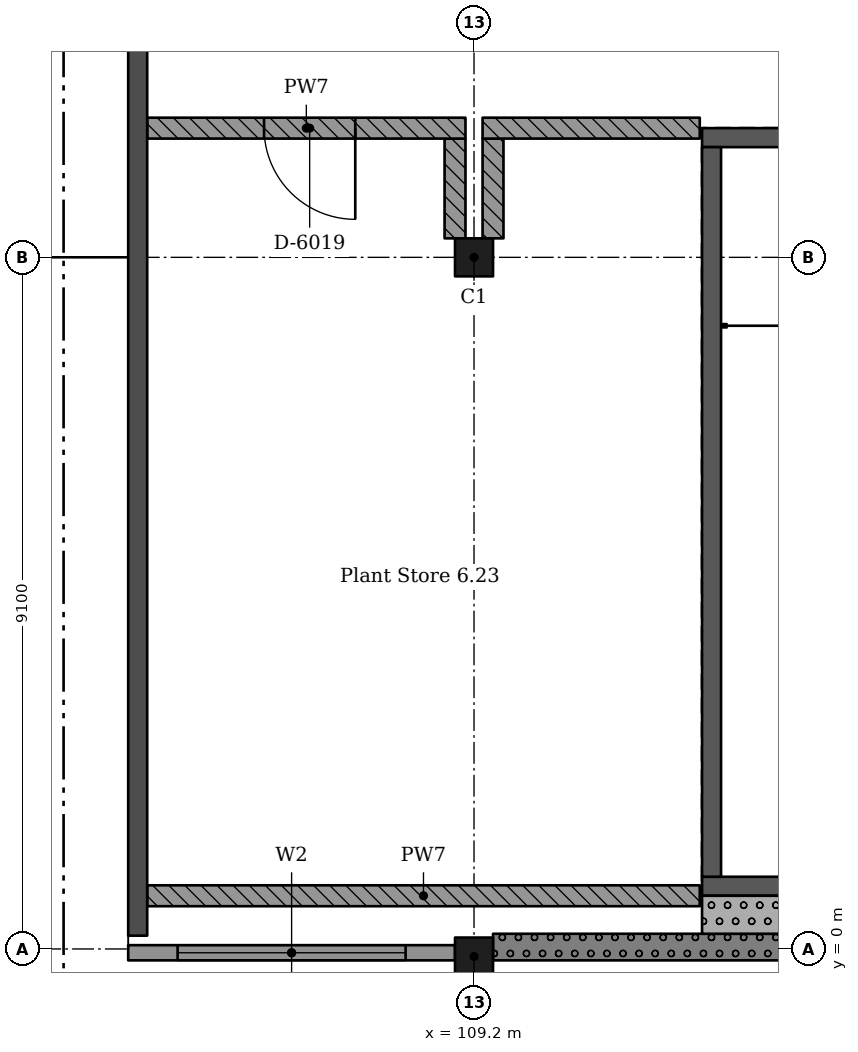
"""IFC4 building model, lengths in metres.
Left out: names, types, materials, properties, quantities, classifications, styles, units other than length and angle.
Written with IfcOpenShell. Run it as: python <this file> out.ifc"""

import sys

from ifc_helpers import new_model, si_unit, direction, frame, frame_2d, origin, origin_2d, place, context, subcontext, project, spatial, rectangle, extrude, element, fill, save


model = new_model("IFC4")
c1 = context("Model", 3, precision=1e-05, world=origin(), true_north=direction((0.0, 1.0)))
c2 = subcontext(c1, "Body", "Model", "MODEL_VIEW")
j1 = project(units=[si_unit("LENGTHUNIT", "METRE"), si_unit("PLANEANGLEUNIT", "RADIAN")], contexts=[c1])
p1 = place(None, origin())
s1 = spatial("IfcSite", under=j1, at=p1, CompositionType="ELEMENT")
p2 = place(p1, origin())
s2 = spatial("IfcBuilding", under=s1, at=p2, CompositionType="ELEMENT")
p3 = place(p2, frame((0.0, 0.0, 29.12)))
s3 = spatial("IfcBuildingStorey", under=s2, at=p3, CompositionType="ELEMENT", Elevation=29.12)
for number, where, z_axis, x_axis in (
    (1, (109.2, -0.1, 0.0), (0.0, 0.0, 1.0), (1.0, 0.0, 0.0)),
    (2, (109.2, 9.1, 0.0), (0.0, 0.0, 1.0), (1.0, 0.0, 0.0)),
):
    element("IfcColumn", number, at=place(p3, frame(where, z_axis=z_axis, x_axis=x_axis)), inside=s3, PredefinedType="COLUMN", context=c2, shape_type="SweptSolid", body=[
        extrude(rectangle(XDim=0.5, YDim=0.5, at=origin_2d()), origin(), (0.0, 0.0, 1.0), 4.55),
    ])
p4 = place(p3, frame((104.775, 40.95, 0.0), z_axis=(0.0, 0.0, 1.0), x_axis=(0.0, -1.0, 0.0)))
e3 = element("IfcWall", 3, at=p4, inside=s3, PredefinedType="SHEAR", context=c2, shape_type="SweptSolid", body=[
    extrude(rectangle(XDim=40.775, YDim=0.25, at=frame_2d((20.387, 0.0))), origin(), (0.0, 0.0, 1.0), 4.55),
])
p5 = place(p3, frame((117.6, 0.825, 0.0), z_axis=(0.0, 0.0, 1.0), x_axis=(-1.0, 0.0, 0.0)))
e4 = element("IfcWall", 4, at=p5, inside=s3, PredefinedType="SHEAR", context=c2, shape_type="SweptSolid", body=[
    extrude(rectangle(XDim=5.4, YDim=0.25, at=frame_2d((2.7, 0.0))), origin(), (0.0, 0.0, 1.0), 4.55),
])
p6 = place(p3, frame((117.6, 10.675, 0.0), z_axis=(0.0, 0.0, 1.0), x_axis=(-1.0, 0.0, 0.0)))
e5 = element("IfcWall", 5, at=p6, inside=s3, PredefinedType="SHEAR", context=c2, shape_type="SweptSolid", body=[
    extrude(rectangle(XDim=5.4, YDim=0.25, at=frame_2d((2.7, 0.0))), origin(), (0.0, 0.0, 1.0), 4.55),
])
p7 = place(p6, frame((1.5, 0.0, 0.0)))
e6 = element("IfcOpeningElement", 6, at=p7, cuts=e5, PredefinedType="OPENING", context=c2, shape_type="SweptSolid", body=[
    extrude(rectangle(XDim=2.4, YDim=2.1, at=frame_2d((1.2, 1.05))), frame((0.0, 0.135, 0.0), z_axis=(0.0, -1.0, 0.0), x_axis=(1.0, 0.0, 0.0)), (0.0, 0.0, 1.0), 0.27),
])
p8 = place(p3, frame((112.325, 10.55, 0.0), z_axis=(0.0, 0.0, 1.0), x_axis=(0.0, -1.0, 0.0)))
e7 = element("IfcWall", 7, at=p8, inside=s3, PredefinedType="SHEAR", context=c2, shape_type="SweptSolid", body=[
    extrude(rectangle(XDim=9.6, YDim=0.25, at=frame_2d((4.8, 0.0))), origin(), (0.0, 0.0, 1.0), 4.55),
])
p9 = place(p3, frame((104.65, -0.05, 0.0), z_axis=(0.0, 0.0, 1.0), x_axis=(1.0, 0.0, 0.0)))
e8 = element("IfcWall", 8, at=p9, inside=s3, PredefinedType="SOLIDWALL", context=c2, shape_type="SweptSolid", body=[
    extrude(rectangle(XDim=4.3, YDim=0.2, at=frame_2d((2.15, 0.0))), origin(), (0.0, 0.0, 1.0), 4.5),
])
p10 = place(p9, frame((0.65, 0.0, 0.6)))
e9 = element("IfcOpeningElement", 9, at=p10, cuts=e8, PredefinedType="OPENING", context=c2, shape_type="SweptSolid", body=[
    extrude(rectangle(XDim=3.0, YDim=3.0, at=frame_2d((1.5, 1.5))), frame((0.0, 0.11, 0.0), z_axis=(0.0, -1.0, 0.0), x_axis=(1.0, 0.0, 0.0)), (0.0, 0.0, 1.0), 0.22),
])
p11 = place(p3, frame((109.45, 0.025, 0.0), z_axis=(0.0, 0.0, 1.0), x_axis=(1.0, 0.0, 0.0)))
e10 = element("IfcWall", 10, at=p11, inside=s3, PredefinedType="SOLIDWALL", context=c2, shape_type="SweptSolid", body=[
    extrude(rectangle(XDim=8.6, YDim=0.35, at=frame_2d((4.3, 0.0))), origin(), (0.0, 0.0, 1.0), 4.5),
])
p12 = place(p3, frame((112.2, 0.45, 0.0), z_axis=(0.0, 0.0, 1.0), x_axis=(1.0, 0.0, 0.0)))
e11 = element("IfcWall", 11, at=p12, inside=s3, PredefinedType="SOLIDWALL", context=c2, shape_type="SweptSolid", body=[
    extrude(rectangle(XDim=5.4, YDim=0.5, at=frame_2d((2.7, 0.0))), origin(), (0.0, 0.0, 1.0), 3.88),
])
p13 = place(p3, frame((108.95, 9.35, 0.0), z_axis=(0.0, 0.0, 1.0), x_axis=(0.0, 1.0, 0.0)))
e12 = element("IfcWall", 12, at=p13, inside=s3, PredefinedType="SOLIDWALL", context=c2, shape_type="SweptSolid", body=[
    extrude(rectangle(XDim=1.312, YDim=0.275, at=frame_2d((0.656, 0.0))), origin(), (0.0, 0.0, 1.0), 3.88),
])
p14 = place(p3, frame((109.087, 10.8, 0.0), z_axis=(0.0, 0.0, 1.0), x_axis=(-1.0, 0.0, 0.0)))
e13 = element("IfcWall", 13, at=p14, inside=s3, PredefinedType="SOLIDWALL", context=c2, shape_type="SweptSolid", body=[
    extrude(rectangle(XDim=4.188, YDim=0.275, at=frame_2d((2.094, 0.0))), origin(), (0.0, 0.0, 1.0), 3.88),
])
p15 = place(p14, frame((1.45, 0.0, 0.0)))
e14 = element("IfcOpeningElement", 14, at=p15, cuts=e13, PredefinedType="OPENING", context=c2, shape_type="SweptSolid", body=[
    extrude(rectangle(XDim=1.2, YDim=2.4, at=frame_2d((0.6, 1.2))), frame((0.0, 0.147, 0.0), z_axis=(0.0, -1.0, 0.0), x_axis=(1.0, 0.0, 0.0)), (0.0, 0.0, 1.0), 0.295),
])
p16 = place(p3, frame((109.45, 10.663, 0.0), z_axis=(0.0, 0.0, 1.0), x_axis=(0.0, -1.0, 0.0)))
e15 = element("IfcWall", 15, at=p16, inside=s3, PredefinedType="SOLIDWALL", context=c2, shape_type="SweptSolid", body=[
    extrude(rectangle(XDim=1.312, YDim=0.275, at=frame_2d((0.656, 0.0))), origin(), (0.0, 0.0, 1.0), 3.88),
])
p17 = place(p3, frame((112.17, 0.7, 0.0), z_axis=(0.0, 0.0, 1.0), x_axis=(-1.0, 0.0, 0.0)))
e16 = element("IfcWall", 16, at=p17, inside=s3, PredefinedType="SOLIDWALL", context=c2, shape_type="SweptSolid", body=[
    extrude(rectangle(XDim=7.27, YDim=0.275, at=frame_2d((3.635, 0.0))), origin(), (0.0, 0.0, 1.0), 3.88),
])
p18 = place(p3, frame((112.17, 10.8, 0.0), z_axis=(0.0, 0.0, 1.0), x_axis=(-1.0, 0.0, 0.0)))
e17 = element("IfcWall", 17, at=p18, inside=s3, PredefinedType="SOLIDWALL", context=c2, shape_type="SweptSolid", body=[
    extrude(rectangle(XDim=2.857, YDim=0.275, at=frame_2d((1.429, 0.0))), origin(), (0.0, 0.0, 1.0), 3.88),
])
p19 = place(p10, origin())
e18 = element("IfcWindow", 18, at=p19, inside=s3, PartitioningType="SINGLE_PANEL", PredefinedType="WINDOW", context=c2, shape_type="SweptSolid", body=[
    extrude(rectangle(XDim=3.0, YDim=3.0, at=frame_2d((1.5, 1.5))), frame((0.0, 0.03, 0.0), z_axis=(0.0, -1.0, 0.0), x_axis=(1.0, 0.0, 0.0)), (0.0, 0.0, 1.0), 0.06),
])
fill(e9, e18)
p20 = place(p15, origin())
e19 = element("IfcDoor", 19, at=p20, inside=s3, OperationType="SINGLE_SWING_RIGHT", PredefinedType="DOOR", context=c2, shape_type="SweptSolid", body=[
    extrude(rectangle(XDim=1.2, YDim=2.4, at=frame_2d((0.6, 1.2))), frame((0.0, 0.025, 0.0), z_axis=(0.0, -1.0, 0.0), x_axis=(1.0, 0.0, 0.0)), (0.0, 0.0, 1.0), 0.05),
])
fill(e14, e19)
save(model, sys.argv[1])
